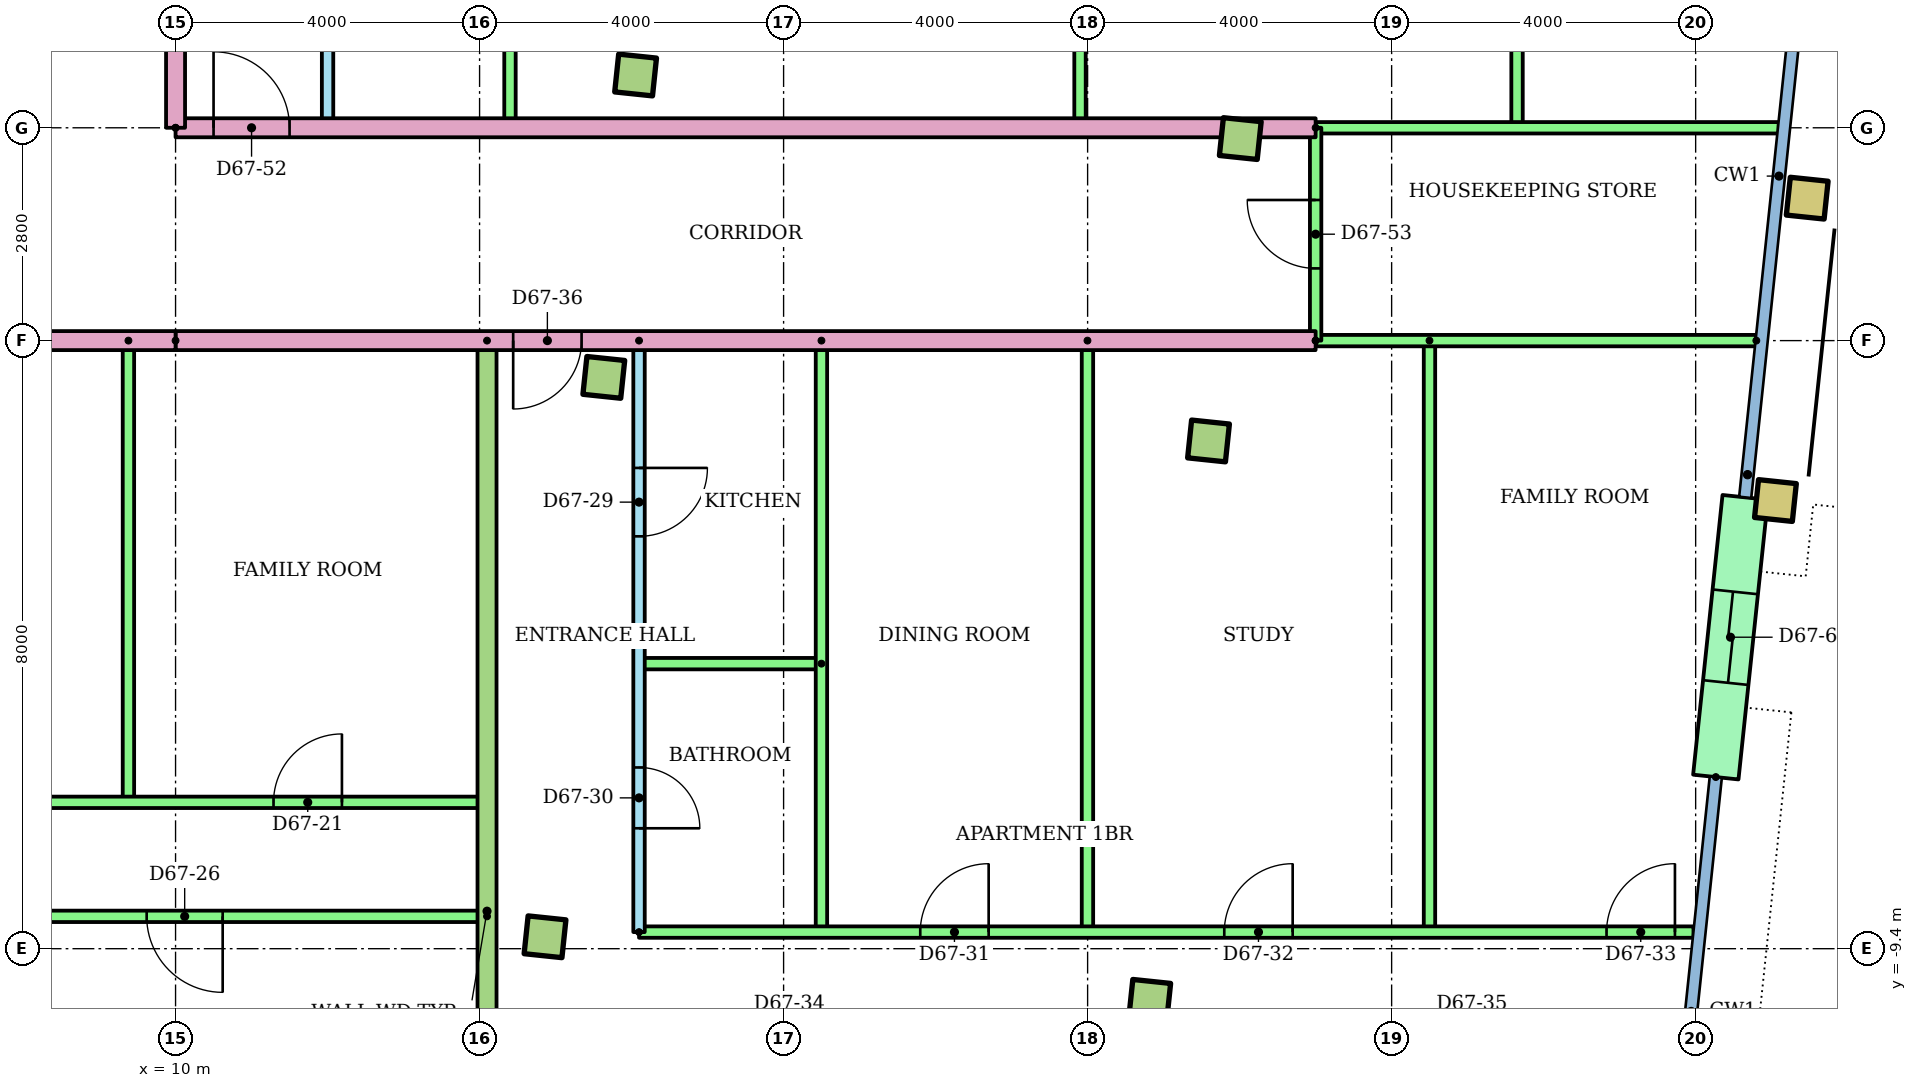
"""IFC4 building model, lengths in metres.
Left out: names, types, materials, properties, quantities, classifications, styles, units other than length and angle.
Written with IfcOpenShell. Run it as: python <this file> out.ifc"""

import sys

from ifc_helpers import new_model, si_unit, direction, frame, frame_2d, origin, origin_2d, place, context, subcontext, project, spatial, rectangle, hollow_rectangle, extrude, element, fill, save


model = new_model("IFC4")
c1 = context("Model", 3, precision=1e-05, world=origin(), true_north=direction((0.0, 1.0)))
c2 = subcontext(c1, "Body", "Model", "MODEL_VIEW")
j1 = project(units=[si_unit("LENGTHUNIT", "METRE"), si_unit("PLANEANGLEUNIT", "RADIAN")], contexts=[c1])
p1 = place(None, origin())
s1 = spatial("IfcSite", under=j1, at=p1, CompositionType="ELEMENT")
p2 = place(p1, origin())
s2 = spatial("IfcBuilding", under=s1, at=p2, CompositionType="ELEMENT")
p3 = place(p2, frame((0.0, 0.0, 259.5)))
s3 = spatial("IfcBuildingStorey", under=s2, at=p3, CompositionType="ELEMENT", Elevation=259.5)
for number, where, z_axis, x_axis in (
    (1, (14.861, -9.243, 0.0), (0.0, 0.0, 1.0), (0.995, -0.105, 0.0)),
    (2, (22.817, -10.08, 0.0), (0.0, 0.0, 1.0), (0.995, -0.105, 0.0)),
    (3, (15.635, -1.884, 0.0), (0.0, 0.0, 1.0), (0.995, -0.105, 0.0)),
    (4, (23.591, -2.72, 0.0), (0.0, 0.0, 1.0), (0.995, -0.105, 0.0)),
):
    element("IfcColumn", number, at=place(p3, frame(where, z_axis=z_axis, x_axis=x_axis)), inside=s3, PredefinedType="COLUMN", context=c2, shape_type="SweptSolid", body=[
        extrude(rectangle(XDim=0.5, YDim=0.5, at=origin_2d()), origin(), (0.0, 0.0, 1.0), 3.2),
    ])
p4 = place(p3, frame((31.05, -3.504, 0.0), z_axis=(0.0, 0.0, 1.0), x_axis=(0.994521895368, -0.104528463268, 0.0)))
e5 = element("IfcColumn", 5, at=p4, inside=s3, PredefinedType="COLUMN", context=c2, shape_type="SweptSolid", body=[
    extrude(hollow_rectangle(XDim=0.5, YDim=0.5, WallThickness=0.025, at=origin_2d()), origin(), (0.0, 0.0, 1.0), 3.2),
])
for number, where, z_axis, x_axis in (
    (6, (16.053, 2.094, 0.0), (0.0, 0.0, 1.0), (0.995, -0.105, 0.0)),
    (7, (24.009, 1.258, 0.0), (0.0, 0.0, 1.0), (0.995, -0.105, 0.0)),
):
    element("IfcColumn", number, at=place(p3, frame(where, z_axis=z_axis, x_axis=x_axis)), inside=s3, PredefinedType="COLUMN", context=c2, shape_type="SweptSolid", body=[
        extrude(rectangle(XDim=0.5, YDim=0.5, at=origin_2d()), origin(), (0.0, 0.0, 1.0), 3.2),
    ])
p5 = place(p3, frame((31.468, 0.474, 0.0), z_axis=(0.0, 0.0, 1.0), x_axis=(0.994521895368, -0.104528463268, 0.0)))
e8 = element("IfcColumn", 8, at=p5, inside=s3, PredefinedType="COLUMN", context=c2, shape_type="SweptSolid", body=[
    extrude(hollow_rectangle(XDim=0.5, YDim=0.5, WallThickness=0.025, at=origin_2d()), origin(), (0.0, 0.0, 1.0), 3.2),
])
p6 = place(p3, frame((30.265, -7.142, 0.0), z_axis=(0.0, 0.0, 1.0), x_axis=(0.104513052986, 0.994523514933, 0.0)))
e9 = element("IfcWall", 9, at=p6, inside=s3, PredefinedType="STANDARD", context=c2, shape_type="SweptSolid", body=[
    extrude(rectangle(XDim=3.7, YDim=0.6, at=frame_2d((1.85, 0.0))), origin(), (0.0, 0.0, 1.0), 2.92),
])
p7 = place(p6, frame((1.25, 0.0, 0.0)))
e10 = element("IfcOpeningElement", 10, at=p7, cuts=e9, PredefinedType="OPENING", context=c2, shape_type="SweptSolid", body=[
    extrude(rectangle(XDim=1.2, YDim=2.1, at=frame_2d((0.6, 1.05))), frame((0.0, 0.31, 0.0), z_axis=(0.0, -1.0, 0.0), x_axis=(1.0, 0.0, 0.0)), (0.0, 0.0, 1.0), 0.62),
])
p8 = place(p3, frame((9.38, -1.4, 0.0), z_axis=(0.0, 0.0, 1.0), x_axis=(0.0, -1.0, 0.0)))
e11 = element("IfcWall", 11, at=p8, inside=s3, PredefinedType="PARTITIONING", context=c2, shape_type="SweptSolid", body=[
    extrude(rectangle(XDim=6.075, YDim=0.15, at=frame_2d((3.037, 0.0))), origin(), (0.0, 0.0, 1.0), 2.4),
])
p9 = place(p3, frame((-7.77, -7.475, 0.0)))
e12 = element("IfcWall", 12, at=p9, inside=s3, PredefinedType="PARTITIONING", context=c2, shape_type="SweptSolid", body=[
    extrude(rectangle(XDim=21.868, YDim=0.15, at=frame_2d((10.934, 0.0))), origin(), (0.0, 0.0, 1.0), 2.4),
])
p10 = place(p9, frame((5.414, 0.0, 0.0)))
e13 = element("IfcOpeningElement", 13, at=p10, cuts=e12, PredefinedType="OPENING", context=c2, shape_type="SweptSolid", body=[
    extrude(rectangle(XDim=0.9, YDim=2.1, at=frame_2d((0.45, 1.05))), frame((0.0, 0.085, 0.0), z_axis=(0.0, -1.0, 0.0), x_axis=(1.0, 0.0, 0.0)), (0.0, 0.0, 1.0), 0.17),
])
p11 = place(p9, frame((13.37, 0.0, 0.0)))
e14 = element("IfcOpeningElement", 14, at=p11, cuts=e12, PredefinedType="OPENING", context=c2, shape_type="SweptSolid", body=[
    extrude(rectangle(XDim=0.9, YDim=2.1, at=frame_2d((0.45, 1.05))), frame((0.0, 0.085, 0.0), z_axis=(0.0, -1.0, 0.0), x_axis=(1.0, 0.0, 0.0)), (0.0, 0.0, 1.0), 0.17),
])
p12 = place(p9, frame((19.059, 0.0, 0.0)))
e15 = element("IfcOpeningElement", 15, at=p12, cuts=e12, PredefinedType="OPENING", context=c2, shape_type="SweptSolid", body=[
    extrude(rectangle(XDim=0.9, YDim=2.1, at=frame_2d((0.45, 1.05))), frame((0.0, 0.085, 0.0), z_axis=(0.0, -1.0, 0.0), x_axis=(1.0, 0.0, 0.0)), (0.0, 0.0, 1.0), 0.17),
])
p13 = place(p3, frame((14.098, -8.975, 0.0), z_axis=(0.0, 0.0, 1.0), x_axis=(-1.0, 0.0, 0.0)))
e16 = element("IfcWall", 16, at=p13, inside=s3, PredefinedType="PARTITIONING", context=c2, shape_type="SweptSolid", body=[
    extrude(rectangle(XDim=23.868, YDim=0.15, at=frame_2d((11.934, 0.0))), origin(), (0.0, 0.0, 1.0), 2.4),
])
p14 = place(p13, frame((21.429, 0.0, 0.0)))
e17 = element("IfcOpeningElement", 17, at=p14, cuts=e16, PredefinedType="OPENING", context=c2, shape_type="SweptSolid", body=[
    extrude(rectangle(XDim=0.9, YDim=2.1, at=frame_2d((0.45, 1.05))), frame((0.0, 0.085, 0.0), z_axis=(0.0, -1.0, 0.0), x_axis=(1.0, 0.0, 0.0)), (0.0, 0.0, 1.0), 0.17),
])
p15 = place(p13, frame((17.451, 0.0, 0.0)))
e18 = element("IfcOpeningElement", 18, at=p15, cuts=e16, PredefinedType="OPENING", context=c2, shape_type="SweptSolid", body=[
    extrude(rectangle(XDim=0.9, YDim=2.1, at=frame_2d((0.45, 1.05))), frame((0.0, 0.085, 0.0), z_axis=(0.0, -1.0, 0.0), x_axis=(1.0, 0.0, 0.0)), (0.0, 0.0, 1.0), 0.17),
])
p16 = place(p13, frame((12.252, 0.0, 0.0)))
e19 = element("IfcOpeningElement", 19, at=p16, cuts=e16, PredefinedType="OPENING", context=c2, shape_type="SweptSolid", body=[
    extrude(rectangle(XDim=0.9, YDim=2.1, at=frame_2d((0.45, 1.05))), frame((0.0, 0.085, 0.0), z_axis=(0.0, -1.0, 0.0), x_axis=(1.0, 0.0, 0.0)), (0.0, 0.0, 1.0), 0.17),
])
p17 = place(p13, frame((9.495, 0.0, 0.0)))
e20 = element("IfcOpeningElement", 20, at=p17, cuts=e16, PredefinedType="OPENING", context=c2, shape_type="SweptSolid", body=[
    extrude(rectangle(XDim=0.9, YDim=2.1, at=frame_2d((0.45, 1.05))), frame((0.0, 0.085, 0.0), z_axis=(0.0, -1.0, 0.0), x_axis=(1.0, 0.0, 0.0)), (0.0, 0.0, 1.0), 0.17),
])
p18 = place(p13, frame((3.478, 0.0, 0.0)))
e21 = element("IfcOpeningElement", 21, at=p18, cuts=e16, PredefinedType="OPENING", context=c2, shape_type="SweptSolid", body=[
    extrude(rectangle(XDim=1.0, YDim=2.1, at=frame_2d((0.5, 1.05))), frame((0.0, 0.085, 0.0), z_axis=(0.0, -1.0, 0.0), x_axis=(1.0, 0.0, 0.0)), (0.0, 0.0, 1.0), 0.17),
])
p19 = place(p3, frame((16.098, -1.4, 0.0), z_axis=(0.0, 0.0, 1.0), x_axis=(0.0, -1.0, 0.0)))
e22 = element("IfcWall", 22, at=p19, inside=s3, PredefinedType="PARTITIONING", context=c2, shape_type="SweptSolid", body=[
    extrude(rectangle(XDim=7.782, YDim=0.15, at=frame_2d((3.891, 0.0))), origin(), (0.0, 0.0, 1.0), 2.4),
])
p20 = place(p19, frame((1.675, 0.0, 0.0)))
e23 = element("IfcOpeningElement", 23, at=p20, cuts=e22, PredefinedType="OPENING", context=c2, shape_type="SweptSolid", body=[
    extrude(rectangle(XDim=0.9, YDim=2.1, at=frame_2d((0.45, 1.05))), frame((0.0, 0.085, 0.0), z_axis=(0.0, -1.0, 0.0), x_axis=(1.0, 0.0, 0.0)), (0.0, 0.0, 1.0), 0.17),
])
p21 = place(p19, frame((5.616, 0.0, 0.0)))
e24 = element("IfcOpeningElement", 24, at=p21, cuts=e22, PredefinedType="OPENING", context=c2, shape_type="SweptSolid", body=[
    extrude(rectangle(XDim=0.8, YDim=2.1, at=frame_2d((0.4, 1.05))), frame((0.0, 0.085, 0.0), z_axis=(0.0, -1.0, 0.0), x_axis=(1.0, 0.0, 0.0)), (0.0, 0.0, 1.0), 0.17),
])
p22 = place(p3, frame((18.498, -5.65, 0.0), z_axis=(0.0, 0.0, 1.0), x_axis=(-1.0, 0.0, 0.0)))
e25 = element("IfcWall", 25, at=p22, inside=s3, PredefinedType="PARTITIONING", context=c2, shape_type="SweptSolid", body=[
    extrude(rectangle(XDim=2.4, YDim=0.15, at=frame_2d((1.2, 0.0))), origin(), (0.0, 0.0, 1.0), 2.4),
])
for number, where, z_axis, x_axis in (
    (26, (18.498, -1.4, 0.0), (0.0, 0.0, 1.0), (0.0, -1.0, 0.0)),
    (27, (21.998, -1.4, 0.0), (0.0, 0.0, 1.0), (0.0, -1.0, 0.0)),
    (28, (26.498, -1.4, 0.0), (0.0, 0.0, 1.0), (0.0, -1.0, 0.0)),
):
    element("IfcWall", number, at=place(p3, frame(where, z_axis=z_axis, x_axis=x_axis)), inside=s3, PredefinedType="PARTITIONING", context=c2, shape_type="SweptSolid", body=[
        extrude(rectangle(XDim=7.782, YDim=0.15, at=frame_2d((3.891, 0.0))), origin(), (0.0, 0.0, 1.0), 2.4),
    ])
p23 = place(p3, frame((16.098, -9.182, 0.0)))
e29 = element("IfcWall", 29, at=p23, inside=s3, PredefinedType="PARTITIONING", context=c2, shape_type="SweptSolid", body=[
    extrude(rectangle(XDim=13.873, YDim=0.15, at=frame_2d((6.937, 0.0))), origin(), (0.0, 0.0, 1.0), 2.4),
])
p24 = place(p23, frame((3.7, 0.0, 0.0)))
e30 = element("IfcOpeningElement", 30, at=p24, cuts=e29, PredefinedType="OPENING", context=c2, shape_type="SweptSolid", body=[
    extrude(rectangle(XDim=0.9, YDim=2.1, at=frame_2d((0.45, 1.05))), frame((0.0, 0.085, 0.0), z_axis=(0.0, -1.0, 0.0), x_axis=(1.0, 0.0, 0.0)), (0.0, 0.0, 1.0), 0.17),
])
p25 = place(p23, frame((7.7, 0.0, 0.0)))
e31 = element("IfcOpeningElement", 31, at=p25, cuts=e29, PredefinedType="OPENING", context=c2, shape_type="SweptSolid", body=[
    extrude(rectangle(XDim=0.9, YDim=2.1, at=frame_2d((0.45, 1.05))), frame((0.0, 0.085, 0.0), z_axis=(0.0, -1.0, 0.0), x_axis=(1.0, 0.0, 0.0)), (0.0, 0.0, 1.0), 0.17),
])
p26 = place(p23, frame((12.729, 0.0, 0.0)))
e32 = element("IfcOpeningElement", 32, at=p26, cuts=e29, PredefinedType="OPENING", context=c2, shape_type="SweptSolid", body=[
    extrude(rectangle(XDim=0.9, YDim=2.1, at=frame_2d((0.45, 1.05))), frame((0.0, 0.085, 0.0), z_axis=(0.0, -1.0, 0.0), x_axis=(1.0, 0.0, 0.0)), (0.0, 0.0, 1.0), 0.17),
])
p27 = place(p3, frame((14.098, -1.4, 0.0), z_axis=(0.0, 0.0, 1.0), x_axis=(0.0, -1.0, 0.0)))
e33 = element("IfcWall", 33, at=p27, inside=s3, PredefinedType="PARTITIONING", context=c2, shape_type="SweptSolid", body=[
    extrude(rectangle(XDim=15.013, YDim=0.25, at=frame_2d((7.506, 0.0))), origin(), (0.0, 0.0, 1.0), 2.4),
])
p28 = place(p3, frame((25.0, -1.4, 0.0), z_axis=(0.0, 0.0, 1.0), x_axis=(-1.0, 0.0, 0.0)))
e34 = element("IfcWall", 34, at=p28, inside=s3, PredefinedType="PARTITIONING", context=c2, shape_type="SweptSolid", body=[
    extrude(rectangle(XDim=15.0, YDim=0.25, at=frame_2d((7.5, 0.0))), origin(), (0.0, 0.0, 1.0), 2.4),
])
p29 = place(p28, frame((9.658, 0.0, 0.0)))
e35 = element("IfcOpeningElement", 35, at=p29, cuts=e34, PredefinedType="OPENING", context=c2, shape_type="SweptSolid", body=[
    extrude(rectangle(XDim=0.9, YDim=2.1, at=frame_2d((0.45, 1.05))), frame((0.0, 0.135, 0.0), z_axis=(0.0, -1.0, 0.0), x_axis=(1.0, 0.0, 0.0)), (0.0, 0.0, 1.0), 0.27),
])
p30 = place(p3, frame((30.798, -1.4, 0.0), z_axis=(0.0, 0.0, 1.0), x_axis=(-1.0, 0.0, 0.0)))
e36 = element("IfcWall", 36, at=p30, inside=s3, PredefinedType="PARTITIONING", context=c2, shape_type="SweptSolid", body=[
    extrude(rectangle(XDim=5.798, YDim=0.15, at=frame_2d((2.899, 0.0))), origin(), (0.0, 0.0, 1.0), 2.4),
])
p31 = place(p3, frame((12.0, 10.943, 0.0), z_axis=(0.0, 0.0, 1.0), x_axis=(0.0, -1.0, 0.0)))
e37 = element("IfcWall", 37, at=p31, inside=s3, PredefinedType="PARTITIONING", context=c2, shape_type="SweptSolid", body=[
    extrude(rectangle(XDim=9.543, YDim=0.15, at=frame_2d((4.772, 0.0))), origin(), (0.0, 0.0, 1.0), 2.4),
])
p32 = place(p31, frame((6.469, 0.0, 0.0)))
e38 = element("IfcOpeningElement", 38, at=p32, cuts=e37, PredefinedType="OPENING", context=c2, shape_type="SweptSolid", body=[
    extrude(rectangle(XDim=0.9, YDim=2.1, at=frame_2d((0.45, 1.05))), frame((0.0, 0.085, 0.0), z_axis=(0.0, -1.0, 0.0), x_axis=(1.0, 0.0, 0.0)), (0.0, 0.0, 1.0), 0.17),
])
p33 = place(p31, frame((1.747, 0.0, 0.0)))
e39 = element("IfcOpeningElement", 39, at=p33, cuts=e37, PredefinedType="OPENING", context=c2, shape_type="SweptSolid", body=[
    extrude(rectangle(XDim=0.8, YDim=2.1, at=frame_2d((0.4, 1.05))), frame((0.0, 0.085, 0.0), z_axis=(0.0, -1.0, 0.0), x_axis=(1.0, 0.0, 0.0)), (0.0, 0.0, 1.0), 0.17),
])
for number, where, z_axis, x_axis in (
    (40, (14.4, 10.943, 0.0), (0.0, 0.0, 1.0), (0.0, -1.0, 0.0)),
    (41, (21.9, 10.943, 0.0), (0.0, 0.0, 1.0), (0.0, -1.0, 0.0)),
    (42, (27.65, 10.943, 0.0), (0.0, 0.0, 1.0), (0.0, -1.0, 0.0)),
):
    element("IfcWall", number, at=place(p3, frame(where, z_axis=z_axis, x_axis=x_axis)), inside=s3, PredefinedType="PARTITIONING", context=c2, shape_type="SweptSolid", body=[
        extrude(rectangle(XDim=9.543, YDim=0.15, at=frame_2d((4.772, 0.0))), origin(), (0.0, 0.0, 1.0), 2.4),
    ])
p34 = place(p3, frame((10.0, 1.4, 0.0)))
e43 = element("IfcWall", 43, at=p34, inside=s3, PredefinedType="PARTITIONING", context=c2, shape_type="SweptSolid", body=[
    extrude(rectangle(XDim=15.0, YDim=0.25, at=frame_2d((7.5, 0.0))), origin(), (0.0, 0.0, 1.0), 2.4),
])
p35 = place(p34, frame((0.5, 0.0, 0.0)))
e44 = element("IfcOpeningElement", 44, at=p35, cuts=e43, PredefinedType="OPENING", context=c2, shape_type="SweptSolid", body=[
    extrude(rectangle(XDim=1.0, YDim=2.1, at=frame_2d((0.5, 1.05))), frame((0.0, 0.135, 0.0), z_axis=(0.0, -1.0, 0.0), x_axis=(1.0, 0.0, 0.0)), (0.0, 0.0, 1.0), 0.27),
])
p36 = place(p3, frame((25.0, 1.4, 0.0)))
e45 = element("IfcWall", 45, at=p36, inside=s3, PredefinedType="PARTITIONING", context=c2, shape_type="SweptSolid", body=[
    extrude(rectangle(XDim=6.093, YDim=0.15, at=frame_2d((3.046, 0.0))), origin(), (0.0, 0.0, 1.0), 2.4),
])
p37 = place(p3, frame((25.0, -1.4, 0.0), z_axis=(0.0, 0.0, 1.0), x_axis=(0.0, 1.0, 0.0)))
e46 = element("IfcWall", 46, at=p37, inside=s3, PredefinedType="PARTITIONING", context=c2, shape_type="SweptSolid", body=[
    extrude(rectangle(XDim=2.8, YDim=0.15, at=frame_2d((1.4, 0.0))), origin(), (0.0, 0.0, 1.0), 2.4),
])
p38 = place(p37, frame((0.95, 0.0, 0.0)))
e47 = element("IfcOpeningElement", 47, at=p38, cuts=e46, PredefinedType="OPENING", context=c2, shape_type="SweptSolid", body=[
    extrude(rectangle(XDim=0.9, YDim=2.1, at=frame_2d((0.45, 1.05))), frame((0.0, 0.085, 0.0), z_axis=(0.0, -1.0, 0.0), x_axis=(1.0, 0.0, 0.0)), (0.0, 0.0, 1.0), 0.17),
])
p39 = place(p3, frame((10.0, -1.4, 0.0), z_axis=(0.0, 0.0, 1.0), x_axis=(-1.0, 0.0, 0.0)))
e48 = element("IfcWall", 48, at=p39, inside=s3, PredefinedType="PARTITIONING", context=c2, shape_type="SweptSolid", body=[
    extrude(rectangle(XDim=20.0, YDim=0.25, at=frame_2d((10.0, 0.0))), origin(), (0.0, 0.0, 1.0), 2.4),
])
p40 = place(p39, frame((18.27, 0.0, 0.0)))
e49 = element("IfcOpeningElement", 49, at=p40, cuts=e48, PredefinedType="OPENING", context=c2, shape_type="SweptSolid", body=[
    extrude(rectangle(XDim=1.0, YDim=2.1, at=frame_2d((0.5, 1.05))), frame((0.0, 0.135, 0.0), z_axis=(0.0, -1.0, 0.0), x_axis=(1.0, 0.0, 0.0)), (0.0, 0.0, 1.0), 0.27),
])
p41 = place(p3, frame((10.0, 1.4, 0.0), z_axis=(0.0, 0.0, 1.0), x_axis=(0.0, 1.0, 0.0)))
e50 = element("IfcWall", 50, at=p41, inside=s3, PredefinedType="PARTITIONING", context=c2, shape_type="SweptSolid", body=[
    extrude(rectangle(XDim=1.6, YDim=0.25, at=frame_2d((0.8, 0.0))), origin(), (0.0, 0.0, 1.0), 2.4),
])
p42 = place(p12, origin())
e51 = element("IfcDoor", 51, at=p42, inside=s3, OperationType="SINGLE_SWING_RIGHT", PredefinedType="DOOR", context=c2, shape_type="SweptSolid", body=[
    extrude(rectangle(XDim=0.9, YDim=2.1, at=frame_2d((0.45, 1.05))), frame((0.0, 0.025, 0.0), z_axis=(0.0, -1.0, 0.0), x_axis=(1.0, 0.0, 0.0)), (0.0, 0.0, 1.0), 0.05),
])
fill(e15, e51)
p43 = place(p18, origin())
e52 = element("IfcDoor", 52, at=p43, inside=s3, OperationType="SINGLE_SWING_LEFT", PredefinedType="DOOR", context=c2, shape_type="SweptSolid", body=[
    extrude(rectangle(XDim=1.0, YDim=2.1, at=frame_2d((0.5, 1.05))), frame((0.0, 0.025, 0.0), z_axis=(0.0, -1.0, 0.0), x_axis=(1.0, 0.0, 0.0)), (0.0, 0.0, 1.0), 0.05),
])
fill(e21, e52)
p44 = place(p20, origin())
e53 = element("IfcDoor", 53, at=p44, inside=s3, OperationType="SINGLE_SWING_LEFT", PredefinedType="DOOR", context=c2, shape_type="SweptSolid", body=[
    extrude(rectangle(XDim=0.9, YDim=2.1, at=frame_2d((0.45, 1.05))), frame((0.0, 0.025, 0.0), z_axis=(0.0, -1.0, 0.0), x_axis=(1.0, 0.0, 0.0)), (0.0, 0.0, 1.0), 0.05),
])
fill(e23, e53)
p45 = place(p21, origin())
e54 = element("IfcDoor", 54, at=p45, inside=s3, OperationType="SINGLE_SWING_RIGHT", PredefinedType="DOOR", context=c2, shape_type="SweptSolid", body=[
    extrude(rectangle(XDim=0.8, YDim=2.1, at=frame_2d((0.4, 1.05))), frame((0.0, 0.025, 0.0), z_axis=(0.0, -1.0, 0.0), x_axis=(1.0, 0.0, 0.0)), (0.0, 0.0, 1.0), 0.05),
])
fill(e24, e54)
p46 = place(p24, origin())
e55 = element("IfcDoor", 55, at=p46, inside=s3, OperationType="SINGLE_SWING_RIGHT", PredefinedType="DOOR", context=c2, shape_type="SweptSolid", body=[
    extrude(rectangle(XDim=0.9, YDim=2.1, at=frame_2d((0.45, 1.05))), frame((0.0, 0.025, 0.0), z_axis=(0.0, -1.0, 0.0), x_axis=(1.0, 0.0, 0.0)), (0.0, 0.0, 1.0), 0.05),
])
fill(e30, e55)
p47 = place(p25, origin())
e56 = element("IfcDoor", 56, at=p47, inside=s3, OperationType="SINGLE_SWING_RIGHT", PredefinedType="DOOR", context=c2, shape_type="SweptSolid", body=[
    extrude(rectangle(XDim=0.9, YDim=2.1, at=frame_2d((0.45, 1.05))), frame((0.0, 0.025, 0.0), z_axis=(0.0, -1.0, 0.0), x_axis=(1.0, 0.0, 0.0)), (0.0, 0.0, 1.0), 0.05),
])
fill(e31, e56)
p48 = place(p26, origin())
e57 = element("IfcDoor", 57, at=p48, inside=s3, OperationType="SINGLE_SWING_RIGHT", PredefinedType="DOOR", context=c2, shape_type="SweptSolid", body=[
    extrude(rectangle(XDim=0.9, YDim=2.1, at=frame_2d((0.45, 1.05))), frame((0.0, 0.025, 0.0), z_axis=(0.0, -1.0, 0.0), x_axis=(1.0, 0.0, 0.0)), (0.0, 0.0, 1.0), 0.05),
])
fill(e32, e57)
p49 = place(p29, origin())
e58 = element("IfcDoor", 58, at=p49, inside=s3, OperationType="SINGLE_SWING_RIGHT", PredefinedType="DOOR", context=c2, shape_type="SweptSolid", body=[
    extrude(rectangle(XDim=0.9, YDim=2.1, at=frame_2d((0.45, 1.05))), frame((0.0, 0.025, 0.0), z_axis=(0.0, -1.0, 0.0), x_axis=(1.0, 0.0, 0.0)), (0.0, 0.0, 1.0), 0.05),
])
fill(e35, e58)
p50 = place(p35, origin())
e59 = element("IfcDoor", 59, at=p50, inside=s3, OperationType="SINGLE_SWING_LEFT", PredefinedType="DOOR", context=c2, shape_type="SweptSolid", body=[
    extrude(rectangle(XDim=1.0, YDim=2.1, at=frame_2d((0.5, 1.05))), frame((0.0, 0.025, 0.0), z_axis=(0.0, -1.0, 0.0), x_axis=(1.0, 0.0, 0.0)), (0.0, 0.0, 1.0), 0.05),
])
fill(e44, e59)
p51 = place(p38, origin())
e60 = element("IfcDoor", 60, at=p51, inside=s3, OperationType="SINGLE_SWING_RIGHT", PredefinedType="DOOR", context=c2, shape_type="SweptSolid", body=[
    extrude(rectangle(XDim=0.9, YDim=2.1, at=frame_2d((0.45, 1.05))), frame((0.0, 0.025, 0.0), z_axis=(0.0, -1.0, 0.0), x_axis=(1.0, 0.0, 0.0)), (0.0, 0.0, 1.0), 0.05),
])
fill(e47, e60)
p52 = place(p7, origin())
e61 = element("IfcDoor", 61, at=p52, inside=s3, OperationType="SLIDING_TO_LEFT", PredefinedType="DOOR", context=c2, shape_type="SweptSolid", body=[
    extrude(rectangle(XDim=1.2, YDim=2.1, at=frame_2d((0.6, 1.05))), frame((0.0, 0.025, 0.0), z_axis=(0.0, -1.0, 0.0), x_axis=(1.0, 0.0, 0.0)), (0.0, 0.0, 1.0), 0.05),
])
fill(e10, e61)
save(model, sys.argv[1])
